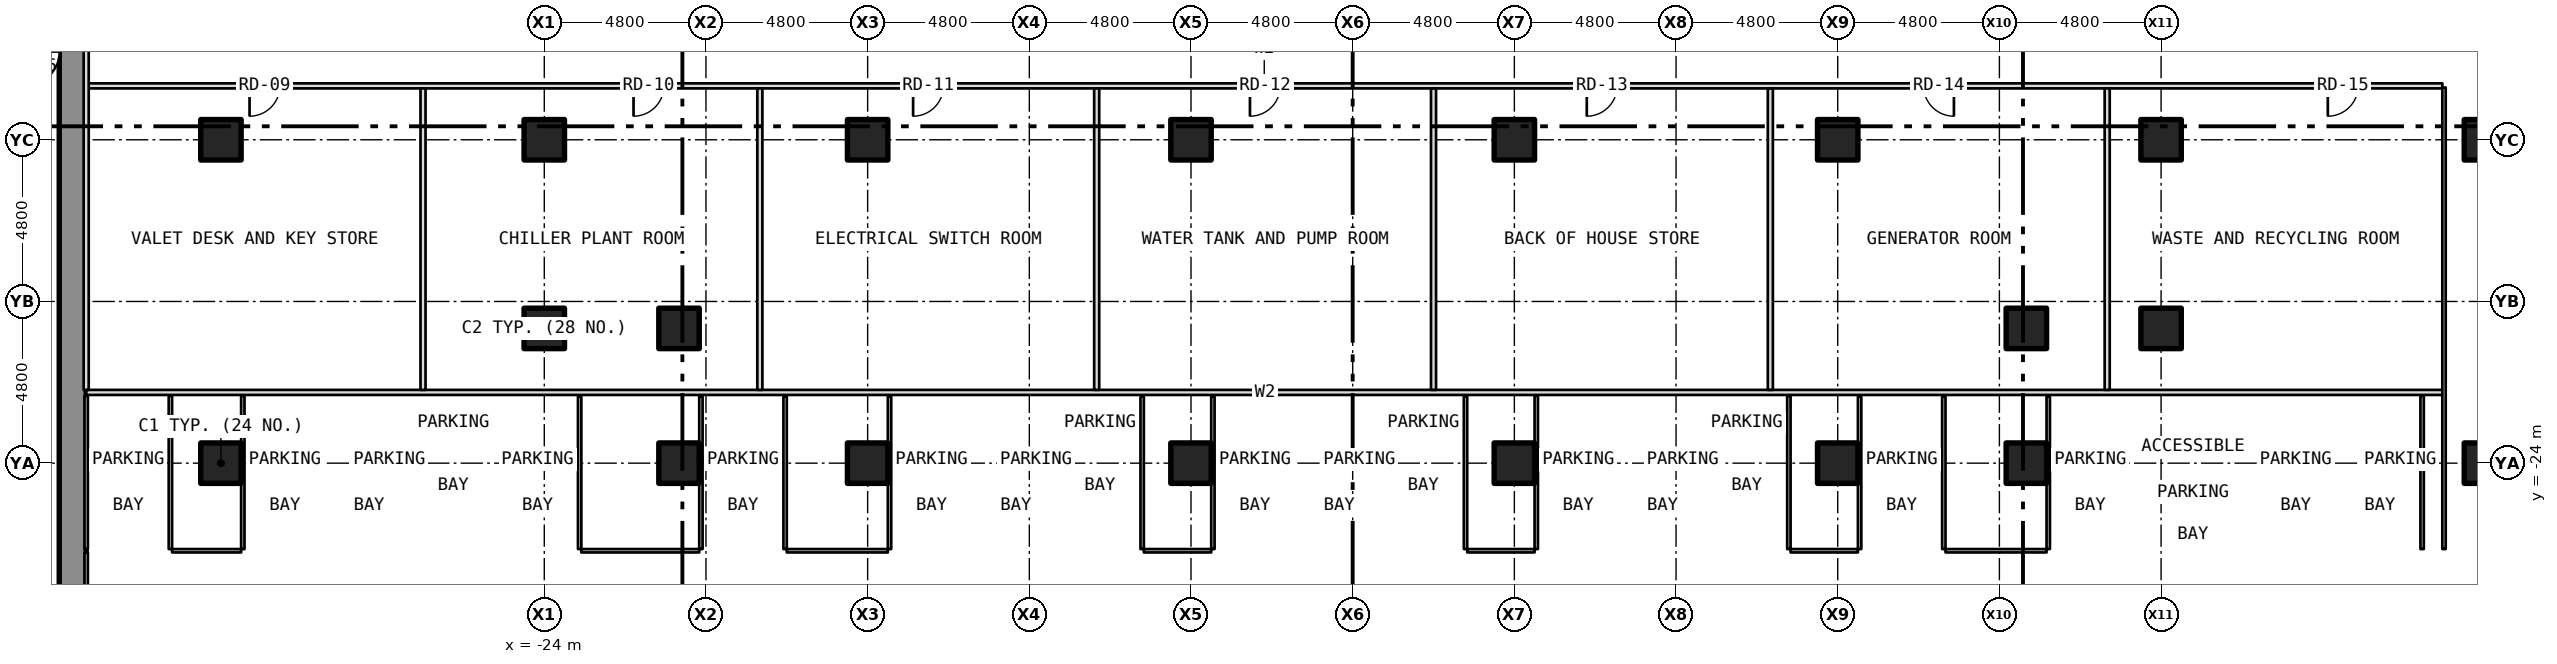
"""IFC4 building model, lengths in metres.
Left out: names, types, materials, properties, quantities, classifications, styles, units other than length and angle.
Written with IfcOpenShell. Run it as: python <this file> out.ifc"""

import sys

from ifc_helpers import new_model, si_unit, direction, frame, frame_2d, origin, origin_2d, place, context, subcontext, project, spatial, rectangle, hollow_rectangle, extrude, element, fill, save


model = new_model("IFC4")
c1 = context("Model", 3, precision=1e-05, world=origin(), true_north=direction((0.0, 1.0)))
c2 = subcontext(c1, "Body", "Model", "MODEL_VIEW")
j1 = project(units=[si_unit("LENGTHUNIT", "METRE"), si_unit("PLANEANGLEUNIT", "RADIAN")], contexts=[c1])
p1 = place(None, origin())
s1 = spatial("IfcSite", under=j1, at=p1, CompositionType="ELEMENT")
p2 = place(p1, origin())
s2 = spatial("IfcBuilding", under=s1, at=p2, CompositionType="ELEMENT")
p3 = place(p2, frame((0.0, 0.0, -5.0)))
s3 = spatial("IfcBuildingStorey", under=s2, at=p3, CompositionType="ELEMENT", Elevation=-5.0)
for number, where, z_axis, x_axis in (
    (1, (-33.6, -24.0, -0.3), (0.0, 0.0, 1.0), (1.0, 0.0, 0.0)),
    (2, (-33.6, -14.4, -0.3), (0.0, 0.0, 1.0), (1.0, 0.0, 0.0)),
    (3, (-20.0, -24.0, -0.3), (0.0, 0.0, 1.0), (1.0, 0.0, 0.0)),
    (4, (-14.4, -24.0, -0.3), (0.0, 0.0, 1.0), (1.0, 0.0, 0.0)),
    (5, (-4.8, -24.0, -0.3), (0.0, 0.0, 1.0), (1.0, 0.0, 0.0)),
    (6, (4.8, -24.0, -0.3), (0.0, 0.0, 1.0), (1.0, 0.0, 0.0)),
    (7, (14.4, -24.0, -0.3), (0.0, 0.0, 1.0), (1.0, 0.0, 0.0)),
    (8, (20.0, -24.0, -0.3), (0.0, 0.0, 1.0), (1.0, 0.0, 0.0)),
    (9, (33.6, -24.0, -0.3), (0.0, 0.0, 1.0), (1.0, 0.0, 0.0)),
    (10, (33.6, -14.4, -0.3), (0.0, 0.0, 1.0), (1.0, 0.0, 0.0)),
    (11, (-24.0, -20.0, -0.3), (0.0, 0.0, 1.0), (1.0, 0.0, 0.0)),
    (12, (-24.0, -14.4, -0.3), (0.0, 0.0, 1.0), (1.0, 0.0, 0.0)),
    (13, (-20.0, -20.0, -0.3), (0.0, 0.0, 1.0), (1.0, 0.0, 0.0)),
    (14, (-14.4, -14.4, -0.3), (0.0, 0.0, 1.0), (1.0, 0.0, 0.0)),
    (15, (-4.8, -14.4, -0.3), (0.0, 0.0, 1.0), (1.0, 0.0, 0.0)),
    (16, (4.8, -14.4, -0.3), (0.0, 0.0, 1.0), (1.0, 0.0, 0.0)),
    (17, (14.4, -14.4, -0.3), (0.0, 0.0, 1.0), (1.0, 0.0, 0.0)),
    (18, (20.0, -20.0, -0.3), (0.0, 0.0, 1.0), (1.0, 0.0, 0.0)),
    (19, (24.0, -20.0, -0.3), (0.0, 0.0, 1.0), (1.0, 0.0, 0.0)),
    (20, (24.0, -14.4, -0.3), (0.0, 0.0, 1.0), (1.0, 0.0, 0.0)),
):
    element("IfcColumn", number, at=place(p3, frame(where, z_axis=z_axis, x_axis=x_axis)), inside=s3, PredefinedType="COLUMN", context=c2, shape_type="SweptSolid", body=[
        extrude(hollow_rectangle(XDim=1.2, YDim=1.2, WallThickness=0.07, at=origin_2d()), origin(), (0.0, 0.0, 1.0), 5.0),
    ])
p4 = place(p3, frame((-38.0, -38.4, -0.3), z_axis=(0.0, 0.0, 1.0), x_axis=(0.0, 1.0, 0.0)))
e21 = element("IfcWall", 21, at=p4, inside=s3, PredefinedType="SOLIDWALL", context=c2, shape_type="SweptSolid", body=[
    extrude(rectangle(XDim=67.2, YDim=0.8, at=frame_2d((33.6, 0.0))), origin(), (0.0, 0.0, 1.0), 4.378),
])
p5 = place(p4, frame((55.7, 0.0, 0.0)))
e22 = element("IfcOpeningElement", 22, at=p5, cuts=e21, PredefinedType="OPENING", context=c2, shape_type="SweptSolid", body=[
    extrude(rectangle(XDim=6.0, YDim=2.5, at=frame_2d((3.0, 1.25))), frame((0.0, 0.412, 0.0), z_axis=(0.0, -1.0, 0.0), x_axis=(1.0, 0.0, 0.0)), (0.0, 0.0, 1.0), 0.824),
])
p6 = place(p2, frame((0.0, 0.0, -10.0)))
s4 = spatial("IfcBuildingStorey", under=s2, at=p6, CompositionType="ELEMENT", Elevation=-10.0)
p7 = place(p6, frame((-46.9, -26.65, -0.3), z_axis=(0.0, 0.0, 1.0), x_axis=(1.0, 0.0, 0.0)))
e23 = element("IfcWall", 23, at=p7, inside=s4, PredefinedType="SOLIDWALL", context=c2, shape_type="SweptSolid", body=[
    extrude(rectangle(XDim=8.5, YDim=0.5, at=frame_2d((4.25, 0.0))), origin(), (0.0, 0.0, 1.0), 10.45),
])
p8 = place(p3, frame((-35.05, -26.6, 0.0), z_axis=(0.0, 0.0, 1.0), x_axis=(1.0, 0.0, 0.0)))
e24 = element("IfcWall", 24, at=p8, inside=s3, PredefinedType="PARTITIONING", context=c2, shape_type="SweptSolid", body=[
    extrude(rectangle(XDim=2.05, YDim=0.1, at=frame_2d((1.025, 0.0))), origin(), (0.0, 0.0, 1.0), 4.7),
])
p9 = place(p3, frame((-22.9, -26.6, 0.0), z_axis=(0.0, 0.0, 1.0), x_axis=(1.0, 0.0, 0.0)))
e25 = element("IfcWall", 25, at=p9, inside=s3, PredefinedType="PARTITIONING", context=c2, shape_type="SweptSolid", body=[
    extrude(rectangle(XDim=3.5, YDim=0.1, at=frame_2d((1.75, 0.0))), origin(), (0.0, 0.0, 1.0), 4.7),
])
p10 = place(p3, frame((-16.8, -26.6, 0.0), z_axis=(0.0, 0.0, 1.0), x_axis=(1.0, 0.0, 0.0)))
e26 = element("IfcWall", 26, at=p10, inside=s3, PredefinedType="PARTITIONING", context=c2, shape_type="SweptSolid", body=[
    extrude(rectangle(XDim=3.0, YDim=0.1, at=frame_2d((1.5, 0.0))), origin(), (0.0, 0.0, 1.0), 4.7),
])
for number, where, z_axis, x_axis in (
    (27, (-6.2, -26.6, 0.0), (0.0, 0.0, 1.0), (1.0, 0.0, 0.0)),
    (28, (3.4, -26.6, 0.0), (0.0, 0.0, 1.0), (1.0, 0.0, 0.0)),
    (29, (13.0, -26.6, 0.0), (0.0, 0.0, 1.0), (1.0, 0.0, 0.0)),
):
    element("IfcWall", number, at=place(p3, frame(where, z_axis=z_axis, x_axis=x_axis)), inside=s3, PredefinedType="PARTITIONING", context=c2, shape_type="SweptSolid", body=[
        extrude(rectangle(XDim=2.0, YDim=0.1, at=frame_2d((1.0, 0.0))), origin(), (0.0, 0.0, 1.0), 4.7),
    ])
p11 = place(p3, frame((17.6, -26.6, 0.0), z_axis=(0.0, 0.0, 1.0), x_axis=(1.0, 0.0, 0.0)))
e30 = element("IfcWall", 30, at=p11, inside=s3, PredefinedType="PARTITIONING", context=c2, shape_type="SweptSolid", body=[
    extrude(rectangle(XDim=3.0, YDim=0.1, at=frame_2d((1.5, 0.0))), origin(), (0.0, 0.0, 1.0), 4.7),
])
p12 = place(p3, frame((-37.6, -21.9, 0.0), z_axis=(0.0, 0.0, 1.0), x_axis=(1.0, 0.0, 0.0)))
e31 = element("IfcWall", 31, at=p12, inside=s3, PredefinedType="PARTITIONING", context=c2, shape_type="SweptSolid", body=[
    extrude(rectangle(XDim=70.0, YDim=0.15, at=frame_2d((35.0, 0.0))), origin(), (0.0, 0.0, 1.0), 4.7),
])
p13 = place(p3, frame((-37.6, -12.8, 0.0), z_axis=(0.0, 0.0, 1.0), x_axis=(1.0, 0.0, 0.0)))
e32 = element("IfcWall", 32, at=p13, inside=s3, PredefinedType="PARTITIONING", context=c2, shape_type="SweptSolid", body=[
    extrude(rectangle(XDim=69.95, YDim=0.15, at=frame_2d((34.975, 0.0))), origin(), (0.0, 0.0, 1.0), 4.7),
])
p14 = place(p13, frame((4.85, 0.0, 0.0)))
e33 = element("IfcOpeningElement", 33, at=p14, cuts=e32, PredefinedType="OPENING", context=c2, shape_type="SweptSolid", body=[
    extrude(rectangle(XDim=0.9, YDim=2.1, at=frame_2d((0.45, 1.05))), frame((0.0, 0.087, 0.0), z_axis=(0.0, -1.0, 0.0), x_axis=(1.0, 0.0, 0.0)), (0.0, 0.0, 1.0), 0.174),
])
p15 = place(p13, frame((16.25, 0.0, 0.0)))
e34 = element("IfcOpeningElement", 34, at=p15, cuts=e32, PredefinedType="OPENING", context=c2, shape_type="SweptSolid", body=[
    extrude(rectangle(XDim=0.9, YDim=2.1, at=frame_2d((0.45, 1.05))), frame((0.0, 0.087, 0.0), z_axis=(0.0, -1.0, 0.0), x_axis=(1.0, 0.0, 0.0)), (0.0, 0.0, 1.0), 0.174),
])
p16 = place(p13, frame((24.55, 0.0, 0.0)))
e35 = element("IfcOpeningElement", 35, at=p16, cuts=e32, PredefinedType="OPENING", context=c2, shape_type="SweptSolid", body=[
    extrude(rectangle(XDim=0.9, YDim=2.1, at=frame_2d((0.45, 1.05))), frame((0.0, 0.087, 0.0), z_axis=(0.0, -1.0, 0.0), x_axis=(1.0, 0.0, 0.0)), (0.0, 0.0, 1.0), 0.174),
])
p17 = place(p13, frame((34.55, 0.0, 0.0)))
e36 = element("IfcOpeningElement", 36, at=p17, cuts=e32, PredefinedType="OPENING", context=c2, shape_type="SweptSolid", body=[
    extrude(rectangle(XDim=0.9, YDim=2.1, at=frame_2d((0.45, 1.05))), frame((0.0, 0.087, 0.0), z_axis=(0.0, -1.0, 0.0), x_axis=(1.0, 0.0, 0.0)), (0.0, 0.0, 1.0), 0.174),
])
p18 = place(p13, frame((44.55, 0.0, 0.0)))
e37 = element("IfcOpeningElement", 37, at=p18, cuts=e32, PredefinedType="OPENING", context=c2, shape_type="SweptSolid", body=[
    extrude(rectangle(XDim=0.9, YDim=2.1, at=frame_2d((0.45, 1.05))), frame((0.0, 0.087, 0.0), z_axis=(0.0, -1.0, 0.0), x_axis=(1.0, 0.0, 0.0)), (0.0, 0.0, 1.0), 0.174),
])
p19 = place(p13, frame((54.55, 0.0, 0.0)))
e38 = element("IfcOpeningElement", 38, at=p19, cuts=e32, PredefinedType="OPENING", context=c2, shape_type="SweptSolid", body=[
    extrude(rectangle(XDim=0.9, YDim=2.1, at=frame_2d((0.45, 1.05))), frame((0.0, 0.087, 0.0), z_axis=(0.0, -1.0, 0.0), x_axis=(1.0, 0.0, 0.0)), (0.0, 0.0, 1.0), 0.174),
])
p20 = place(p13, frame((66.55, 0.0, 0.0)))
e39 = element("IfcOpeningElement", 39, at=p20, cuts=e32, PredefinedType="OPENING", context=c2, shape_type="SweptSolid", body=[
    extrude(rectangle(XDim=0.9, YDim=2.1, at=frame_2d((0.45, 1.05))), frame((0.0, 0.087, 0.0), z_axis=(0.0, -1.0, 0.0), x_axis=(1.0, 0.0, 0.0)), (0.0, 0.0, 1.0), 0.174),
])
p21 = place(p3, frame((-37.6, -32.55, 0.0), z_axis=(0.0, 0.0, 1.0), x_axis=(0.0, 1.0, 0.0)))
e40 = element("IfcWall", 40, at=p21, inside=s3, PredefinedType="PARTITIONING", context=c2, shape_type="SweptSolid", body=[
    extrude(rectangle(XDim=5.9, YDim=0.1, at=frame_2d((2.95, 0.0))), origin(), (0.0, 0.0, 1.0), 4.7),
])
p22 = place(p3, frame((-37.6, -26.55, 0.0), z_axis=(0.0, 0.0, 1.0), x_axis=(0.0, 1.0, 0.0)))
e41 = element("IfcWall", 41, at=p22, inside=s3, PredefinedType="PARTITIONING", context=c2, shape_type="SweptSolid", body=[
    extrude(rectangle(XDim=4.55, YDim=0.1, at=frame_2d((2.275, 0.0))), origin(), (0.0, 0.0, 1.0), 4.7),
])
p23 = place(p3, frame((-37.6, -21.825, 0.0), z_axis=(0.0, 0.0, 1.0), x_axis=(0.0, 1.0, 0.0)))
e42 = element("IfcWall", 42, at=p23, inside=s3, PredefinedType="PARTITIONING", context=c2, shape_type="SweptSolid", body=[
    extrude(rectangle(XDim=34.075, YDim=0.15, at=frame_2d((17.038, 0.0))), origin(), (0.0, 0.0, 1.0), 4.7),
])
for number, where, z_axis, x_axis in (
    (43, (-35.1, -26.55, 0.0), (0.0, 0.0, 1.0), (0.0, 1.0, 0.0)),
    (44, (-32.95, -26.55, 0.0), (0.0, 0.0, 1.0), (0.0, 1.0, 0.0)),
):
    element("IfcWall", number, at=place(p3, frame(where, z_axis=z_axis, x_axis=x_axis)), inside=s3, PredefinedType="PARTITIONING", context=c2, shape_type="SweptSolid", body=[
        extrude(rectangle(XDim=4.55, YDim=0.1, at=frame_2d((2.275, 0.0))), origin(), (0.0, 0.0, 1.0), 4.7),
    ])
p24 = place(p3, frame((-27.6, -21.825, 0.0), z_axis=(0.0, 0.0, 1.0), x_axis=(0.0, 1.0, 0.0)))
e45 = element("IfcWall", 45, at=p24, inside=s3, PredefinedType="PARTITIONING", context=c2, shape_type="SweptSolid", body=[
    extrude(rectangle(XDim=8.95, YDim=0.15, at=frame_2d((4.475, 0.0))), origin(), (0.0, 0.0, 1.0), 4.7),
])
p25 = place(p3, frame((-22.95, -26.55, 0.0), z_axis=(0.0, 0.0, 1.0), x_axis=(0.0, 1.0, 0.0)))
e46 = element("IfcWall", 46, at=p25, inside=s3, PredefinedType="PARTITIONING", context=c2, shape_type="SweptSolid", body=[
    extrude(rectangle(XDim=4.525, YDim=0.1, at=frame_2d((2.263, 0.0))), origin(), (0.0, 0.0, 1.0), 4.7),
])
p26 = place(p3, frame((-19.35, -26.55, 0.0), z_axis=(0.0, 0.0, 1.0), x_axis=(0.0, 1.0, 0.0)))
e47 = element("IfcWall", 47, at=p26, inside=s3, PredefinedType="PARTITIONING", context=c2, shape_type="SweptSolid", body=[
    extrude(rectangle(XDim=2.64, YDim=0.1, at=frame_2d((1.32, 0.0))), origin(), (0.0, 0.0, 1.0), 4.7),
])
p27 = place(p3, frame((-19.35, -23.91, 0.0), z_axis=(0.0, 0.0, 1.0), x_axis=(0.0, 1.0, 0.0)))
e48 = element("IfcWall", 48, at=p27, inside=s3, PredefinedType="PARTITIONING", context=c2, shape_type="SweptSolid", body=[
    extrude(rectangle(XDim=1.885, YDim=0.1, at=frame_2d((0.942, 0.0))), origin(), (0.0, 0.0, 1.0), 4.083),
])
p28 = place(p3, frame((-17.6, -21.825, 0.0), z_axis=(0.0, 0.0, 1.0), x_axis=(0.0, 1.0, 0.0)))
e49 = element("IfcWall", 49, at=p28, inside=s3, PredefinedType="PARTITIONING", context=c2, shape_type="SweptSolid", body=[
    extrude(rectangle(XDim=8.95, YDim=0.15, at=frame_2d((4.475, 0.0))), origin(), (0.0, 0.0, 1.0), 4.7),
])
for number, where, z_axis, x_axis in (
    (50, (-16.85, -26.55, 0.0), (0.0, 0.0, 1.0), (0.0, 1.0, 0.0)),
    (51, (-13.75, -26.55, 0.0), (0.0, 0.0, 1.0), (0.0, 1.0, 0.0)),
):
    element("IfcWall", number, at=place(p3, frame(where, z_axis=z_axis, x_axis=x_axis)), inside=s3, PredefinedType="PARTITIONING", context=c2, shape_type="SweptSolid", body=[
        extrude(rectangle(XDim=4.525, YDim=0.1, at=frame_2d((2.263, 0.0))), origin(), (0.0, 0.0, 1.0), 4.7),
    ])
p29 = place(p3, frame((-7.6, -21.825, 0.0), z_axis=(0.0, 0.0, 1.0), x_axis=(0.0, 1.0, 0.0)))
e52 = element("IfcWall", 52, at=p29, inside=s3, PredefinedType="PARTITIONING", context=c2, shape_type="SweptSolid", body=[
    extrude(rectangle(XDim=8.95, YDim=0.15, at=frame_2d((4.475, 0.0))), origin(), (0.0, 0.0, 1.0), 4.7),
])
for number, where, z_axis, x_axis in (
    (53, (-6.25, -26.55, 0.0), (0.0, 0.0, 1.0), (0.0, 1.0, 0.0)),
    (54, (-4.15, -26.55, 0.0), (0.0, 0.0, 1.0), (0.0, 1.0, 0.0)),
):
    element("IfcWall", number, at=place(p3, frame(where, z_axis=z_axis, x_axis=x_axis)), inside=s3, PredefinedType="PARTITIONING", context=c2, shape_type="SweptSolid", body=[
        extrude(rectangle(XDim=4.525, YDim=0.1, at=frame_2d((2.263, 0.0))), origin(), (0.0, 0.0, 1.0), 4.7),
    ])
p30 = place(p3, frame((2.4, -21.825, 0.0), z_axis=(0.0, 0.0, 1.0), x_axis=(0.0, 1.0, 0.0)))
e55 = element("IfcWall", 55, at=p30, inside=s3, PredefinedType="PARTITIONING", context=c2, shape_type="SweptSolid", body=[
    extrude(rectangle(XDim=8.95, YDim=0.15, at=frame_2d((4.475, 0.0))), origin(), (0.0, 0.0, 1.0), 4.7),
])
p31 = place(p3, frame((3.35, -26.55, 0.0), z_axis=(0.0, 0.0, 1.0), x_axis=(0.0, 1.0, 0.0)))
e56 = element("IfcWall", 56, at=p31, inside=s3, PredefinedType="PARTITIONING", context=c2, shape_type="SweptSolid", body=[
    extrude(rectangle(XDim=4.525, YDim=0.1, at=frame_2d((2.263, 0.0))), origin(), (0.0, 0.0, 1.0), 4.7),
])
p32 = place(p3, frame((5.45, -26.55, 0.0), z_axis=(0.0, 0.0, 1.0), x_axis=(0.0, 1.0, 0.0)))
e57 = element("IfcWall", 57, at=p32, inside=s3, PredefinedType="PARTITIONING", context=c2, shape_type="SweptSolid", body=[
    extrude(rectangle(XDim=4.55, YDim=0.1, at=frame_2d((2.275, 0.0))), origin(), (0.0, 0.0, 1.0), 4.7),
])
p33 = place(p3, frame((12.4, -21.825, 0.0), z_axis=(0.0, 0.0, 1.0), x_axis=(0.0, 1.0, 0.0)))
e58 = element("IfcWall", 58, at=p33, inside=s3, PredefinedType="PARTITIONING", context=c2, shape_type="SweptSolid", body=[
    extrude(rectangle(XDim=8.95, YDim=0.15, at=frame_2d((4.475, 0.0))), origin(), (0.0, 0.0, 1.0), 4.7),
])
p34 = place(p3, frame((12.95, -26.55, 0.0), z_axis=(0.0, 0.0, 1.0), x_axis=(0.0, 1.0, 0.0)))
e59 = element("IfcWall", 59, at=p34, inside=s3, PredefinedType="PARTITIONING", context=c2, shape_type="SweptSolid", body=[
    extrude(rectangle(XDim=4.55, YDim=0.1, at=frame_2d((2.275, 0.0))), origin(), (0.0, 0.0, 1.0), 4.7),
])
for number, where, z_axis, x_axis in (
    (60, (15.05, -26.55, 0.0), (0.0, 0.0, 1.0), (0.0, 1.0, 0.0)),
    (61, (17.55, -26.55, 0.0), (0.0, 0.0, 1.0), (0.0, 1.0, 0.0)),
    (62, (20.65, -26.55, 0.0), (0.0, 0.0, 1.0), (0.0, 1.0, 0.0)),
):
    element("IfcWall", number, at=place(p3, frame(where, z_axis=z_axis, x_axis=x_axis)), inside=s3, PredefinedType="PARTITIONING", context=c2, shape_type="SweptSolid", body=[
        extrude(rectangle(XDim=4.525, YDim=0.1, at=frame_2d((2.263, 0.0))), origin(), (0.0, 0.0, 1.0), 4.7),
    ])
p35 = place(p3, frame((22.4, -21.825, 0.0), z_axis=(0.0, 0.0, 1.0), x_axis=(0.0, 1.0, 0.0)))
e63 = element("IfcWall", 63, at=p35, inside=s3, PredefinedType="PARTITIONING", context=c2, shape_type="SweptSolid", body=[
    extrude(rectangle(XDim=8.95, YDim=0.15, at=frame_2d((4.475, 0.0))), origin(), (0.0, 0.0, 1.0), 4.7),
])
p36 = place(p3, frame((31.75, -26.55, 0.0), z_axis=(0.0, 0.0, 1.0), x_axis=(0.0, 1.0, 0.0)))
e64 = element("IfcWall", 64, at=p36, inside=s3, PredefinedType="PARTITIONING", context=c2, shape_type="SweptSolid", body=[
    extrude(rectangle(XDim=4.55, YDim=0.1, at=frame_2d((2.275, 0.0))), origin(), (0.0, 0.0, 1.0), 4.7),
])
p37 = place(p3, frame((32.4, -26.55, 0.0), z_axis=(0.0, 0.0, 1.0), x_axis=(0.0, 1.0, 0.0)))
e65 = element("IfcWall", 65, at=p37, inside=s3, PredefinedType="PARTITIONING", context=c2, shape_type="SweptSolid", body=[
    extrude(rectangle(XDim=13.7, YDim=0.1, at=frame_2d((6.85, 0.0))), origin(), (0.0, 0.0, 1.0), 4.7),
])
p38 = place(p14, origin())
e66 = element("IfcDoor", 66, at=p38, inside=s3, OperationType="SINGLE_SWING_LEFT", PredefinedType="DOOR", context=c2, shape_type="SweptSolid", body=[
    extrude(rectangle(XDim=0.9, YDim=2.1, at=frame_2d((0.45, 1.05))), frame((0.0, 0.025, 0.0), z_axis=(0.0, -1.0, 0.0), x_axis=(1.0, 0.0, 0.0)), (0.0, 0.0, 1.0), 0.05),
])
fill(e33, e66)
p39 = place(p15, origin())
e67 = element("IfcDoor", 67, at=p39, inside=s3, OperationType="SINGLE_SWING_LEFT", PredefinedType="DOOR", context=c2, shape_type="SweptSolid", body=[
    extrude(rectangle(XDim=0.9, YDim=2.1, at=frame_2d((0.45, 1.05))), frame((0.0, 0.025, 0.0), z_axis=(0.0, -1.0, 0.0), x_axis=(1.0, 0.0, 0.0)), (0.0, 0.0, 1.0), 0.05),
])
fill(e34, e67)
p40 = place(p16, origin())
e68 = element("IfcDoor", 68, at=p40, inside=s3, OperationType="SINGLE_SWING_LEFT", PredefinedType="DOOR", context=c2, shape_type="SweptSolid", body=[
    extrude(rectangle(XDim=0.9, YDim=2.1, at=frame_2d((0.45, 1.05))), frame((0.0, 0.025, 0.0), z_axis=(0.0, -1.0, 0.0), x_axis=(1.0, 0.0, 0.0)), (0.0, 0.0, 1.0), 0.05),
])
fill(e35, e68)
p41 = place(p17, origin())
e69 = element("IfcDoor", 69, at=p41, inside=s3, OperationType="SINGLE_SWING_LEFT", PredefinedType="DOOR", context=c2, shape_type="SweptSolid", body=[
    extrude(rectangle(XDim=0.9, YDim=2.1, at=frame_2d((0.45, 1.05))), frame((0.0, 0.025, 0.0), z_axis=(0.0, -1.0, 0.0), x_axis=(1.0, 0.0, 0.0)), (0.0, 0.0, 1.0), 0.05),
])
fill(e36, e69)
p42 = place(p18, origin())
e70 = element("IfcDoor", 70, at=p42, inside=s3, OperationType="SINGLE_SWING_LEFT", PredefinedType="DOOR", context=c2, shape_type="SweptSolid", body=[
    extrude(rectangle(XDim=0.9, YDim=2.1, at=frame_2d((0.45, 1.05))), frame((0.0, 0.025, 0.0), z_axis=(0.0, -1.0, 0.0), x_axis=(1.0, 0.0, 0.0)), (0.0, 0.0, 1.0), 0.05),
])
fill(e37, e70)
p43 = place(p19, origin())
e71 = element("IfcDoor", 71, at=p43, inside=s3, OperationType="SINGLE_SWING_RIGHT", PredefinedType="DOOR", context=c2, shape_type="SweptSolid", body=[
    extrude(rectangle(XDim=0.9, YDim=2.1, at=frame_2d((0.45, 1.05))), frame((0.0, 0.025, 0.0), z_axis=(0.0, -1.0, 0.0), x_axis=(1.0, 0.0, 0.0)), (0.0, 0.0, 1.0), 0.05),
])
fill(e38, e71)
p44 = place(p20, origin())
e72 = element("IfcDoor", 72, at=p44, inside=s3, OperationType="SINGLE_SWING_LEFT", PredefinedType="DOOR", context=c2, shape_type="SweptSolid", body=[
    extrude(rectangle(XDim=0.9, YDim=2.1, at=frame_2d((0.45, 1.05))), frame((0.0, 0.025, 0.0), z_axis=(0.0, -1.0, 0.0), x_axis=(1.0, 0.0, 0.0)), (0.0, 0.0, 1.0), 0.05),
])
fill(e39, e72)
save(model, sys.argv[1])
